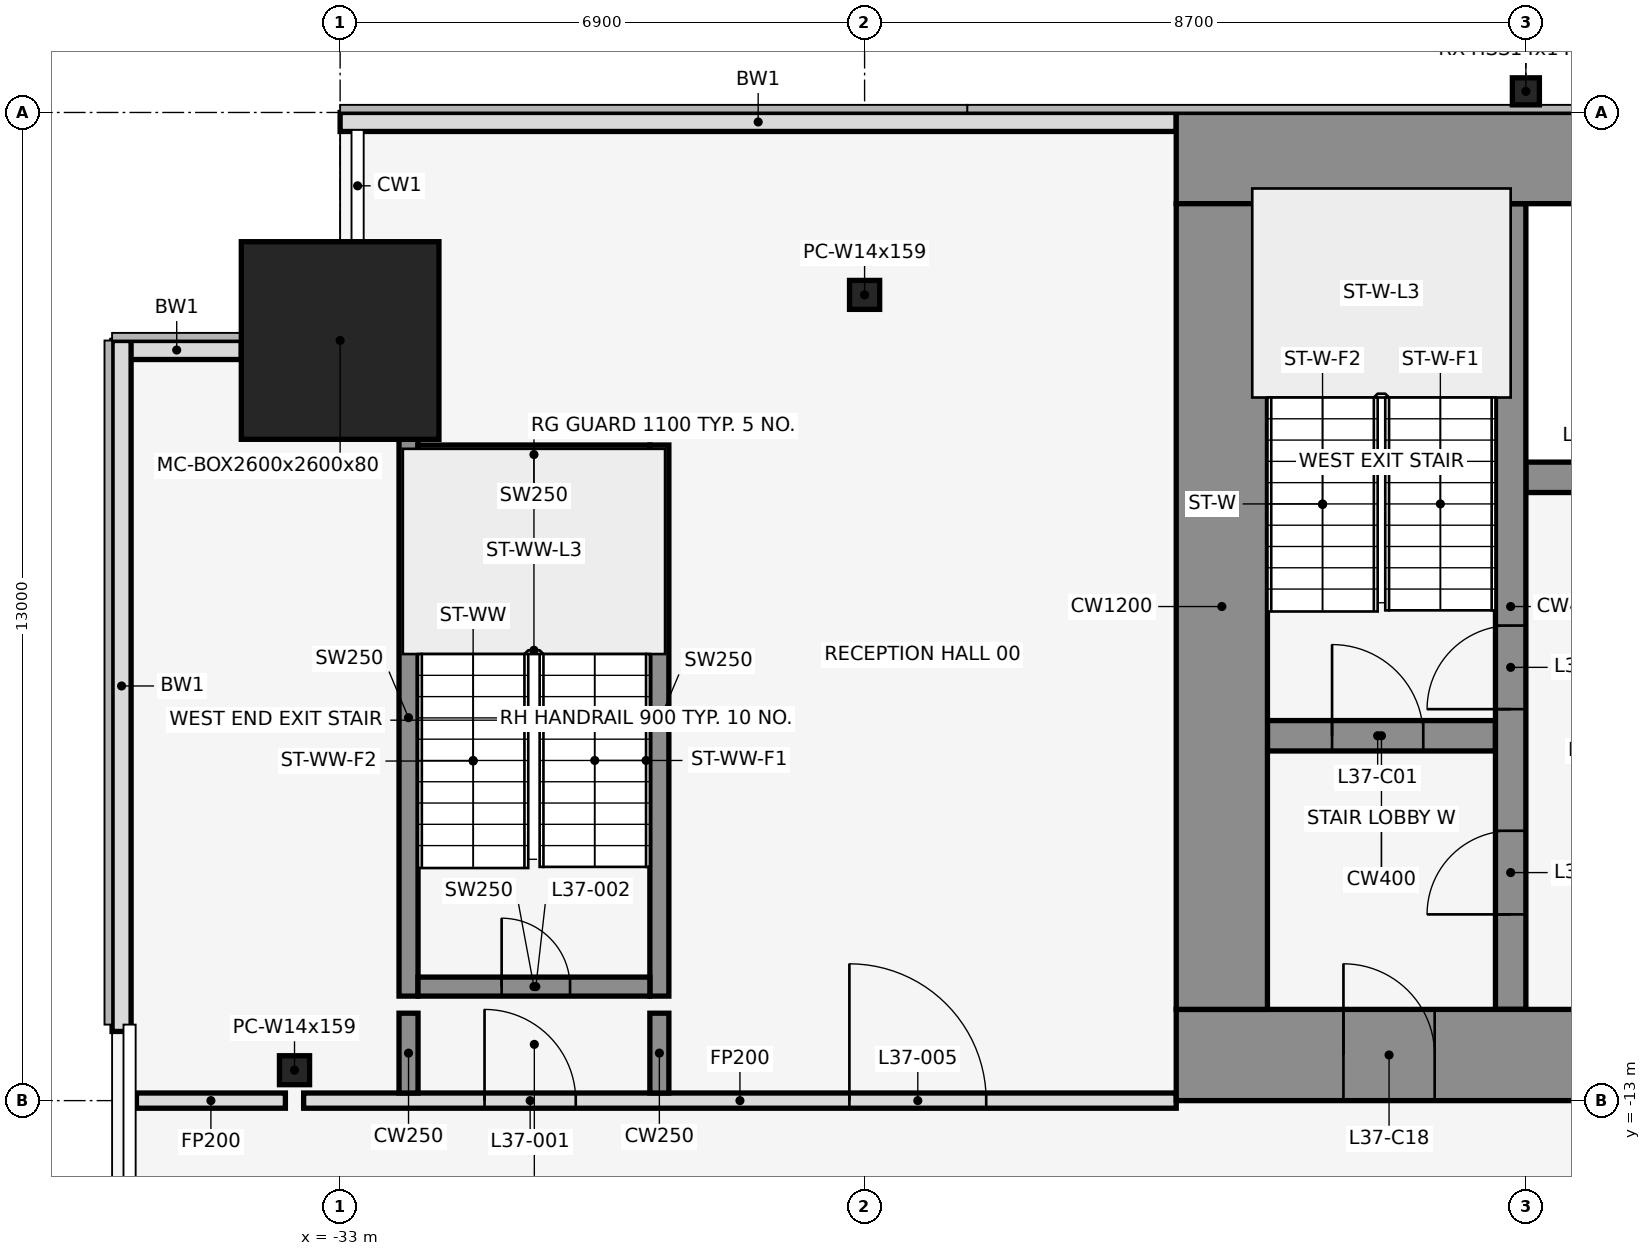
"""IFC4 building model, lengths in metres.
Left out: names, types, materials, properties, quantities, classifications, styles, units other than length and angle.
Written with IfcOpenShell. Run it as: python <this file> out.ifc"""

import sys

from ifc_helpers import new_model, si_unit, direction, frame, frame_2d, origin, origin_2d, place, context, subcontext, project, spatial, rectangle, hollow_rectangle, i_section, extrude, element, fill, save


model = new_model("IFC4")
c1 = context("Model", 3, precision=1e-05, world=origin(), true_north=direction((0.0, 1.0)))
c2 = subcontext(c1, "Body", "Model", "MODEL_VIEW")
j1 = project(units=[si_unit("LENGTHUNIT", "METRE"), si_unit("PLANEANGLEUNIT", "RADIAN")], contexts=[c1])
p1 = place(None, origin())
s1 = spatial("IfcSite", under=j1, at=p1, CompositionType="ELEMENT")
p2 = place(p1, origin())
s2 = spatial("IfcBuilding", under=s1, at=p2, CompositionType="ELEMENT")
p3 = place(p2, frame((0.0, 0.0, 169.1)))
s3 = spatial("IfcBuildingStorey", under=s2, at=p3, CompositionType="ELEMENT", Elevation=169.1)
p4 = place(p3, frame((-33.0, -3.0, 0.0), z_axis=(0.0, 0.0, 1.0), x_axis=(1.0, 0.0, 0.0)))
e1 = element("IfcColumn", 1, at=p4, inside=s3, PredefinedType="COLUMN", context=c2, shape_type="SweptSolid", body=[
    extrude(hollow_rectangle(XDim=2.6, YDim=2.6, WallThickness=0.08, at=origin_2d()), origin(), (0.0, 0.0, 1.0), 4.1),
])
p5 = place(p3, frame((-26.1, -2.4, 0.0), z_axis=(0.0, 0.0, 1.0), x_axis=(1.0, 0.0, 0.0)))
e2 = element("IfcColumn", 2, at=p5, inside=s3, PredefinedType="COLUMN", context=c2, shape_type="SweptSolid", body=[
    extrude(i_section(OverallWidth=0.396, OverallDepth=0.381, WebThickness=0.019, FlangeThickness=0.03, at=origin_2d()), origin(), (0.0, 0.0, 1.0), 4.1),
])
p6 = place(p3, frame((-17.4, 0.278, 0.0), z_axis=(0.0, 0.0, 1.0), x_axis=(1.0, 0.0, 0.0)))
e3 = element("IfcColumn", 3, at=p6, inside=s3, PredefinedType="COLUMN", context=c2, shape_type="SweptSolid", body=[
    extrude(hollow_rectangle(XDim=0.356, YDim=0.356, WallThickness=0.012, at=origin_2d()), origin(), (0.0, 0.0, 1.0), 4.1),
])
p7 = place(p3, frame((-33.6, -12.6, 0.0), z_axis=(0.0, 0.0, 1.0), x_axis=(1.0, 0.0, 0.0)))
e4 = element("IfcColumn", 4, at=p7, inside=s3, PredefinedType="COLUMN", context=c2, shape_type="SweptSolid", body=[
    extrude(i_section(OverallWidth=0.396, OverallDepth=0.381, WebThickness=0.019, FlangeThickness=0.03, at=origin_2d()), origin(), (0.0, 0.0, 1.0), 4.1),
])
p8 = place(p3, frame((-22.0, -0.125, 0.0), z_axis=(0.0, 0.0, 1.0), x_axis=(-1.0, 0.0, 0.0)))
e5 = element("IfcWall", 5, at=p8, inside=s3, PredefinedType="STANDARD", context=c2, shape_type="SweptSolid", body=[
    extrude(rectangle(XDim=11.0, YDim=0.25, at=frame_2d((5.5, 0.0))), origin(), (0.0, 0.0, 1.0), 3.95),
])
p9 = place(p3, frame((-34.3, -3.125, 0.0), z_axis=(0.0, 0.0, 1.0), x_axis=(-1.0, 0.0, 0.0)))
e6 = element("IfcWall", 6, at=p9, inside=s3, PredefinedType="STANDARD", context=c2, shape_type="SweptSolid", body=[
    extrude(rectangle(XDim=1.7, YDim=0.25, at=frame_2d((0.85, 0.0))), origin(), (0.0, 0.0, 1.0), 3.95),
])
p10 = place(p3, frame((-35.875, -3.0, 0.0), z_axis=(0.0, 0.0, 1.0), x_axis=(0.0, -1.0, 0.0)))
e7 = element("IfcWall", 7, at=p10, inside=s3, PredefinedType="STANDARD", context=c2, shape_type="SweptSolid", body=[
    extrude(rectangle(XDim=9.09, YDim=0.25, at=frame_2d((4.545, 0.0))), origin(), (0.0, 0.0, 1.0), 3.95),
])
p11 = place(p3, frame((-32.1, -11.625, 0.0), z_axis=(0.0, 0.0, 1.0), x_axis=(0.0, 1.0, 0.0)))
e8 = element("IfcWall", 8, at=p11, inside=s3, PredefinedType="SHEAR", context=c2, shape_type="SweptSolid", body=[
    extrude(rectangle(XDim=7.325, YDim=0.25, at=frame_2d((3.663, 0.0))), origin(), (0.0, 0.0, 1.0), 4.1),
])
p12 = place(p3, frame((-28.8, -11.625, 0.0), z_axis=(0.0, 0.0, 1.0), x_axis=(0.0, 1.0, 0.0)))
e9 = element("IfcWall", 9, at=p12, inside=s3, PredefinedType="SHEAR", context=c2, shape_type="SweptSolid", body=[
    extrude(rectangle(XDim=7.25, YDim=0.25, at=frame_2d((3.625, 0.0))), origin(), (0.0, 0.0, 1.0), 4.1),
])
p13 = place(p3, frame((-31.975, -11.5, 0.0), z_axis=(0.0, 0.0, 1.0), x_axis=(1.0, 0.0, 0.0)))
e10 = element("IfcWall", 10, at=p13, inside=s3, PredefinedType="SHEAR", context=c2, shape_type="SweptSolid", body=[
    extrude(rectangle(XDim=3.05, YDim=0.25, at=frame_2d((1.525, 0.0))), origin(), (0.0, 0.0, 1.0), 4.1),
])
p14 = place(p13, frame((1.1, 0.0, 0.0)))
e11 = element("IfcOpeningElement", 11, at=p14, cuts=e10, PredefinedType="OPENING", context=c2, shape_type="SweptSolid", body=[
    extrude(rectangle(XDim=0.9, YDim=2.1, at=frame_2d((0.45, 1.05))), frame((0.0, 0.137, 0.0), z_axis=(0.0, -1.0, 0.0), x_axis=(1.0, 0.0, 0.0)), (0.0, 0.0, 1.0), 0.274),
])
p15 = place(p3, frame((-31.975, -4.5, 0.0), z_axis=(0.0, 0.0, 1.0), x_axis=(1.0, 0.0, 0.0)))
e12 = element("IfcWall", 12, at=p15, inside=s3, PredefinedType="SHEAR", context=c2, shape_type="SweptSolid", body=[
    extrude(rectangle(XDim=3.05, YDim=0.25, at=frame_2d((1.525, 0.0))), origin(), (0.0, 0.0, 1.0), 4.1),
])
p16 = place(p3, frame((-35.68, -13.0, 0.0), z_axis=(0.0, 0.0, 1.0), x_axis=(1.0, 0.0, 0.0)))
e13 = element("IfcWall", 13, at=p16, inside=s3, PredefinedType="PARTITIONING", context=c2, shape_type="SweptSolid", body=[
    extrude(rectangle(XDim=1.96, YDim=0.2, at=frame_2d((0.98, 0.0))), origin(), (0.0, 0.0, 1.0), 2.84),
])
p17 = place(p3, frame((-33.48, -13.0, 0.0), z_axis=(0.0, 0.0, 1.0), x_axis=(1.0, 0.0, 0.0)))
e14 = element("IfcWall", 14, at=p17, inside=s3, PredefinedType="PARTITIONING", context=c2, shape_type="SweptSolid", body=[
    extrude(rectangle(XDim=11.48, YDim=0.2, at=frame_2d((5.74, 0.0))), origin(), (0.0, 0.0, 1.0), 2.84),
])
p18 = place(p17, frame((2.38, 0.0, 0.0)))
e15 = element("IfcOpeningElement", 15, at=p18, cuts=e14, PredefinedType="OPENING", context=c2, shape_type="SweptSolid", body=[
    extrude(rectangle(XDim=1.2, YDim=2.1, at=frame_2d((0.6, 1.05))), frame((0.0, 0.112, 0.0), z_axis=(0.0, -1.0, 0.0), x_axis=(1.0, 0.0, 0.0)), (0.0, 0.0, 1.0), 0.224),
])
p19 = place(p17, frame((7.18, 0.0, 0.0)))
e16 = element("IfcOpeningElement", 16, at=p19, cuts=e14, PredefinedType="OPENING", context=c2, shape_type="SweptSolid", body=[
    extrude(rectangle(XDim=1.8, YDim=2.1, at=frame_2d((0.9, 1.05))), frame((0.0, 0.112, 0.0), z_axis=(0.0, -1.0, 0.0), x_axis=(1.0, 0.0, 0.0)), (0.0, 0.0, 1.0), 0.224),
])
for number, where, z_axis, x_axis in (
    (17, (-32.1, -12.9, 0.0), (0.0, 0.0, 1.0), (0.0, 1.0, 0.0)),
    (18, (-28.8, -12.9, 0.0), (0.0, 0.0, 1.0), (0.0, 1.0, 0.0)),
):
    element("IfcWall", number, at=place(p3, frame(where, z_axis=z_axis, x_axis=x_axis)), inside=s3, PredefinedType="SHEAR", context=c2, shape_type="SweptSolid", body=[
        extrude(rectangle(XDim=1.05, YDim=0.25, at=frame_2d((0.525, 0.0))), origin(), (0.0, 0.0, 1.0), 4.1),
    ])
p20 = place(p3, frame((-20.8, -8.2, 0.0), z_axis=(0.0, 0.0, 1.0), x_axis=(1.0, 0.0, 0.0)))
e19 = element("IfcWall", 19, at=p20, inside=s3, PredefinedType="SHEAR", context=c2, shape_type="SweptSolid", body=[
    extrude(rectangle(XDim=3.0, YDim=0.4, at=frame_2d((1.5, 0.0))), origin(), (0.0, 0.0, 1.0), 4.1),
])
p21 = place(p20, frame((0.85, 0.0, 0.0)))
e20 = element("IfcOpeningElement", 20, at=p21, cuts=e19, PredefinedType="OPENING", context=c2, shape_type="SweptSolid", body=[
    extrude(rectangle(XDim=1.2, YDim=2.1, at=frame_2d((0.6, 1.05))), frame((0.0, 0.212, 0.0), z_axis=(0.0, -1.0, 0.0), x_axis=(1.0, 0.0, 0.0)), (0.0, 0.0, 1.0), 0.424),
])
p22 = place(p3, frame((-17.4, -4.8, 0.0), z_axis=(0.0, 0.0, 1.0), x_axis=(1.0, 0.0, 0.0)))
e21 = element("IfcWall", 21, at=p22, inside=s3, PredefinedType="SHEAR", context=c2, shape_type="SweptSolid", body=[
    extrude(rectangle(XDim=13.6, YDim=0.4, at=frame_2d((6.8, 0.0))), origin(), (0.0, 0.0, 1.0), 4.1),
])
p23 = place(p22, frame((0.65, 0.0, 0.0)))
e22 = element("IfcOpeningElement", 22, at=p23, cuts=e21, PredefinedType="OPENING", context=c2, shape_type="SweptSolid", body=[
    extrude(rectangle(XDim=1.1, YDim=2.1, at=frame_2d((0.55, 1.05))), frame((0.0, 0.212, 0.0), z_axis=(0.0, -1.0, 0.0), x_axis=(1.0, 0.0, 0.0)), (0.0, 0.0, 1.0), 0.424),
])
p24 = place(p22, frame((2.95, 0.0, 0.0)))
e23 = element("IfcOpeningElement", 23, at=p24, cuts=e21, PredefinedType="OPENING", context=c2, shape_type="SweptSolid", body=[
    extrude(rectangle(XDim=1.1, YDim=2.1, at=frame_2d((0.55, 1.05))), frame((0.0, 0.212, 0.0), z_axis=(0.0, -1.0, 0.0), x_axis=(1.0, 0.0, 0.0)), (0.0, 0.0, 1.0), 0.424),
])
p25 = place(p22, frame((8.75, 0.0, 0.0)))
e24 = element("IfcOpeningElement", 24, at=p25, cuts=e21, PredefinedType="OPENING", context=c2, shape_type="SweptSolid", body=[
    extrude(rectangle(XDim=0.9, YDim=2.1, at=frame_2d((0.45, 1.05))), frame((0.0, 0.212, 0.0), z_axis=(0.0, -1.0, 0.0), x_axis=(1.0, 0.0, 0.0)), (0.0, 0.0, 1.0), 0.424),
])
p26 = place(p3, frame((-17.6, -11.8, 0.0), z_axis=(0.0, 0.0, 1.0), x_axis=(0.0, 1.0, 0.0)))
e25 = element("IfcWall", 25, at=p26, inside=s3, PredefinedType="SHEAR", context=c2, shape_type="SweptSolid", body=[
    extrude(rectangle(XDim=10.6, YDim=0.4, at=frame_2d((5.3, 0.0))), origin(), (0.0, 0.0, 1.0), 4.1),
])
p27 = place(p26, frame((1.25, 0.0, 0.0)))
e26 = element("IfcOpeningElement", 26, at=p27, cuts=e25, PredefinedType="OPENING", context=c2, shape_type="SweptSolid", body=[
    extrude(rectangle(XDim=1.1, YDim=2.1, at=frame_2d((0.55, 1.05))), frame((0.0, 0.212, 0.0), z_axis=(0.0, -1.0, 0.0), x_axis=(1.0, 0.0, 0.0)), (0.0, 0.0, 1.0), 0.424),
])
p28 = place(p26, frame((3.95, 0.0, 0.0)))
e27 = element("IfcOpeningElement", 27, at=p28, cuts=e25, PredefinedType="OPENING", context=c2, shape_type="SweptSolid", body=[
    extrude(rectangle(XDim=1.1, YDim=2.1, at=frame_2d((0.55, 1.05))), frame((0.0, 0.212, 0.0), z_axis=(0.0, -1.0, 0.0), x_axis=(1.0, 0.0, 0.0)), (0.0, 0.0, 1.0), 0.424),
])
p29 = place(p3, frame((-22.0, -0.6, 0.0), z_axis=(0.0, 0.0, 1.0), x_axis=(1.0, 0.0, 0.0)))
e28 = element("IfcWall", 28, at=p29, inside=s3, PredefinedType="SHEAR", context=c2, shape_type="SweptSolid", body=[
    extrude(rectangle(XDim=44.0, YDim=1.2, at=frame_2d((22.0, 0.0))), origin(), (0.0, 0.0, 1.0), 4.1),
])
p30 = place(p29, frame((18.55, 0.0, 0.0)))
e29 = element("IfcOpeningElement", 29, at=p30, cuts=e28, PredefinedType="OPENING", context=c2, shape_type="SweptSolid", body=[
    extrude(rectangle(XDim=0.9, YDim=2.1, at=frame_2d((0.45, 1.05))), frame((0.0, 0.612, 0.0), z_axis=(0.0, -1.0, 0.0), x_axis=(1.0, 0.0, 0.0)), (0.0, 0.0, 1.0), 1.224),
])
p31 = place(p29, frame((24.55, 0.0, 0.0)))
e30 = element("IfcOpeningElement", 30, at=p31, cuts=e28, PredefinedType="OPENING", context=c2, shape_type="SweptSolid", body=[
    extrude(rectangle(XDim=0.9, YDim=2.1, at=frame_2d((0.45, 1.05))), frame((0.0, 0.612, 0.0), z_axis=(0.0, -1.0, 0.0), x_axis=(1.0, 0.0, 0.0)), (0.0, 0.0, 1.0), 1.224),
])
p32 = place(p3, frame((-22.0, -12.4, 0.0), z_axis=(0.0, 0.0, 1.0), x_axis=(1.0, 0.0, 0.0)))
e31 = element("IfcWall", 31, at=p32, inside=s3, PredefinedType="SHEAR", context=c2, shape_type="SweptSolid", body=[
    extrude(rectangle(XDim=44.0, YDim=1.2, at=frame_2d((22.0, 0.0))), origin(), (0.0, 0.0, 1.0), 4.1),
])
p33 = place(p32, frame((2.2, 0.0, 0.0)))
e32 = element("IfcOpeningElement", 32, at=p33, cuts=e31, PredefinedType="OPENING", context=c2, shape_type="SweptSolid", body=[
    extrude(rectangle(XDim=1.2, YDim=2.1, at=frame_2d((0.6, 1.05))), frame((0.0, 0.612, 0.0), z_axis=(0.0, -1.0, 0.0), x_axis=(1.0, 0.0, 0.0)), (0.0, 0.0, 1.0), 1.224),
])
p34 = place(p32, frame((21.4, 0.0, 0.0)))
e33 = element("IfcOpeningElement", 33, at=p34, cuts=e31, PredefinedType="OPENING", context=c2, shape_type="SweptSolid", body=[
    extrude(rectangle(XDim=1.2, YDim=2.1, at=frame_2d((0.6, 1.05))), frame((0.0, 0.612, 0.0), z_axis=(0.0, -1.0, 0.0), x_axis=(1.0, 0.0, 0.0)), (0.0, 0.0, 1.0), 1.224),
])
p35 = place(p32, frame((40.6, 0.0, 0.0)))
e34 = element("IfcOpeningElement", 34, at=p35, cuts=e31, PredefinedType="OPENING", context=c2, shape_type="SweptSolid", body=[
    extrude(rectangle(XDim=1.2, YDim=2.1, at=frame_2d((0.6, 1.05))), frame((0.0, 0.612, 0.0), z_axis=(0.0, -1.0, 0.0), x_axis=(1.0, 0.0, 0.0)), (0.0, 0.0, 1.0), 1.224),
])
p36 = place(p32, frame((16.0, 0.0, 0.0)))
e35 = element("IfcOpeningElement", 35, at=p36, cuts=e31, PredefinedType="OPENING", context=c2, shape_type="SweptSolid", body=[
    extrude(rectangle(XDim=1.8, YDim=2.1, at=frame_2d((0.9, 1.05))), frame((0.0, 0.612, 0.0), z_axis=(0.0, -1.0, 0.0), x_axis=(1.0, 0.0, 0.0)), (0.0, 0.0, 1.0), 1.224),
])
p37 = place(p32, frame((6.3, 0.0, 0.0)))
e36 = element("IfcOpeningElement", 36, at=p37, cuts=e31, PredefinedType="OPENING", context=c2, shape_type="SweptSolid", body=[
    extrude(rectangle(XDim=1.2, YDim=2.1, at=frame_2d((0.6, 1.05))), frame((0.0, 0.612, 0.0), z_axis=(0.0, -1.0, 0.0), x_axis=(1.0, 0.0, 0.0)), (0.0, 0.0, 1.0), 1.224),
])
p38 = place(p32, frame((26.2, 0.0, 0.0)))
e37 = element("IfcOpeningElement", 37, at=p38, cuts=e31, PredefinedType="OPENING", context=c2, shape_type="SweptSolid", body=[
    extrude(rectangle(XDim=1.8, YDim=2.1, at=frame_2d((0.9, 1.05))), frame((0.0, 0.612, 0.0), z_axis=(0.0, -1.0, 0.0), x_axis=(1.0, 0.0, 0.0)), (0.0, 0.0, 1.0), 1.224),
])
p39 = place(p32, frame((36.5, 0.0, 0.0)))
e38 = element("IfcOpeningElement", 38, at=p39, cuts=e31, PredefinedType="OPENING", context=c2, shape_type="SweptSolid", body=[
    extrude(rectangle(XDim=1.2, YDim=2.1, at=frame_2d((0.6, 1.05))), frame((0.0, 0.612, 0.0), z_axis=(0.0, -1.0, 0.0), x_axis=(1.0, 0.0, 0.0)), (0.0, 0.0, 1.0), 1.224),
])
p40 = place(p3, frame((-21.4, -11.8, 0.0), z_axis=(0.0, 0.0, 1.0), x_axis=(0.0, 1.0, 0.0)))
e39 = element("IfcWall", 39, at=p40, inside=s3, PredefinedType="SHEAR", context=c2, shape_type="SweptSolid", body=[
    extrude(rectangle(XDim=10.6, YDim=1.2, at=frame_2d((5.3, 0.0))), origin(), (0.0, 0.0, 1.0), 4.1),
])
p41 = place(p18, origin())
e40 = element("IfcDoor", 40, at=p41, inside=s3, OperationType="SINGLE_SWING_LEFT", PredefinedType="DOOR", context=c2, shape_type="SweptSolid", body=[
    extrude(rectangle(XDim=1.2, YDim=2.1, at=frame_2d((0.6, 1.05))), frame((0.0, 0.025, 0.0), z_axis=(0.0, -1.0, 0.0), x_axis=(1.0, 0.0, 0.0)), (0.0, 0.0, 1.0), 0.05),
])
fill(e15, e40)
p42 = place(p14, origin())
e41 = element("IfcDoor", 41, at=p42, inside=s3, OperationType="SINGLE_SWING_LEFT", PredefinedType="DOOR", context=c2, shape_type="SweptSolid", body=[
    extrude(rectangle(XDim=0.9, YDim=2.1, at=frame_2d((0.45, 1.05))), frame((0.0, 0.025, 0.0), z_axis=(0.0, -1.0, 0.0), x_axis=(1.0, 0.0, 0.0)), (0.0, 0.0, 1.0), 0.05),
])
fill(e11, e41)
p43 = place(p19, origin())
e42 = element("IfcDoor", 42, at=p43, inside=s3, OperationType="SINGLE_SWING_LEFT", PredefinedType="DOOR", context=c2, shape_type="SweptSolid", body=[
    extrude(rectangle(XDim=1.8, YDim=2.1, at=frame_2d((0.9, 1.05))), frame((0.0, 0.025, 0.0), z_axis=(0.0, -1.0, 0.0), x_axis=(1.0, 0.0, 0.0)), (0.0, 0.0, 1.0), 0.05),
])
fill(e16, e42)
p44 = place(p21, origin())
e43 = element("IfcDoor", 43, at=p44, inside=s3, OperationType="SINGLE_SWING_LEFT", PredefinedType="DOOR", context=c2, shape_type="SweptSolid", body=[
    extrude(rectangle(XDim=1.2, YDim=2.1, at=frame_2d((0.6, 1.05))), frame((0.0, 0.025, 0.0), z_axis=(0.0, -1.0, 0.0), x_axis=(1.0, 0.0, 0.0)), (0.0, 0.0, 1.0), 0.05),
])
fill(e20, e43)
p45 = place(p27, frame((1.1, 0.0, 0.0), z_axis=(0.0, 0.0, 1.0), x_axis=(-1.0, 0.0, 0.0)))
e44 = element("IfcDoor", 44, at=p45, inside=s3, OperationType="SINGLE_SWING_LEFT", PredefinedType="DOOR", context=c2, shape_type="SweptSolid", body=[
    extrude(rectangle(XDim=1.1, YDim=2.1, at=frame_2d((0.55, 1.05))), frame((0.0, 0.025, 0.0), z_axis=(0.0, -1.0, 0.0), x_axis=(1.0, 0.0, 0.0)), (0.0, 0.0, 1.0), 0.05),
])
fill(e26, e44)
p46 = place(p28, frame((1.1, 0.0, 0.0), z_axis=(0.0, 0.0, 1.0), x_axis=(-1.0, 0.0, 0.0)))
e45 = element("IfcDoor", 45, at=p46, inside=s3, OperationType="SINGLE_SWING_LEFT", PredefinedType="DOOR", context=c2, shape_type="SweptSolid", body=[
    extrude(rectangle(XDim=1.1, YDim=2.1, at=frame_2d((0.55, 1.05))), frame((0.0, 0.025, 0.0), z_axis=(0.0, -1.0, 0.0), x_axis=(1.0, 0.0, 0.0)), (0.0, 0.0, 1.0), 0.05),
])
fill(e27, e45)
p47 = place(p33, frame((1.2, 0.0, 0.0), z_axis=(0.0, 0.0, 1.0), x_axis=(-1.0, 0.0, 0.0)))
e46 = element("IfcDoor", 46, at=p47, inside=s3, OperationType="SINGLE_SWING_RIGHT", PredefinedType="DOOR", context=c2, shape_type="SweptSolid", body=[
    extrude(rectangle(XDim=1.2, YDim=2.1, at=frame_2d((0.6, 1.05))), frame((0.0, 0.025, 0.0), z_axis=(0.0, -1.0, 0.0), x_axis=(1.0, 0.0, 0.0)), (0.0, 0.0, 1.0), 0.05),
])
fill(e32, e46)
save(model, sys.argv[1])
